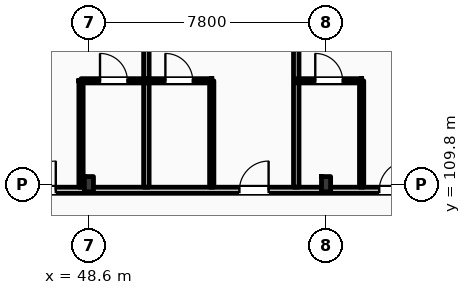
"""IFC4 building model, lengths in metres.
Left out: names, types, materials, properties, quantities, classifications, styles, units other than length and angle.
Written with IfcOpenShell. Run it as: python <this file> out.ifc"""

import sys

from ifc_helpers import new_model, si_unit, direction, frame, frame_2d, origin, origin_2d, place, context, subcontext, project, spatial, rectangle, i_section, extrude, element, fill, save


model = new_model("IFC4")
c1 = context("Model", 3, precision=1e-05, world=origin(), true_north=direction((0.0, 1.0)))
c2 = subcontext(c1, "Body", "Model", "MODEL_VIEW")
j1 = project(units=[si_unit("LENGTHUNIT", "METRE"), si_unit("PLANEANGLEUNIT", "RADIAN")], contexts=[c1])
p1 = place(None, origin())
s1 = spatial("IfcSite", under=j1, at=p1, CompositionType="ELEMENT")
p2 = place(p1, origin())
s2 = spatial("IfcBuilding", under=s1, at=p2, CompositionType="ELEMENT")
p3 = place(p2, frame((0.0, 0.0, 31.8)))
s3 = spatial("IfcBuildingStorey", under=s2, at=p3, CompositionType="ELEMENT", Elevation=31.8)
for number, where, z_axis, x_axis in (
    (1, (48.6, 109.8, 0.0), (0.0, 0.0, 1.0), (1.0, 0.0, 0.0)),
    (2, (56.4, 109.8, 0.0), (0.0, 0.0, 1.0), (1.0, 0.0, 0.0)),
):
    element("IfcColumn", number, at=place(p3, frame(where, z_axis=z_axis, x_axis=x_axis)), inside=s3, PredefinedType="COLUMN", context=c2, shape_type="SweptSolid", body=[
        extrude(i_section(OverallWidth=0.3, OverallDepth=0.5, WebThickness=0.014, FlangeThickness=0.028, FilletRadius=0.027, at=origin_2d()), origin(), (0.0, 0.0, 1.0), 3.6),
    ])
p4 = place(p3, frame((10.65, 109.6, 0.0), z_axis=(0.0, 0.0, 1.0), x_axis=(1.0, 0.0, 0.0)))
e3 = element("IfcWall", 3, at=p4, inside=s3, PredefinedType="PARTITIONING", context=c2, shape_type="SweptSolid", body=[
    extrude(rectangle(XDim=109.21, YDim=0.2, at=frame_2d((54.605, 0.0))), origin(), (0.0, 0.0, 1.0), 2.72),
])
p5 = place(p4, frame((15.825, 0.0, 0.0)))
e4 = element("IfcOpeningElement", 4, at=p5, cuts=e3, PredefinedType="OPENING", context=c2, shape_type="SweptSolid", body=[
    extrude(rectangle(XDim=1.02, YDim=2.2, at=frame_2d((0.51, 1.1))), frame((0.0, 0.11, 0.0), z_axis=(0.0, -1.0, 0.0), x_axis=(1.0, 0.0, 0.0)), (0.0, 0.0, 1.0), 0.22),
])
p6 = place(p4, frame((19.87, 0.0, 0.0)))
e5 = element("IfcOpeningElement", 5, at=p6, cuts=e3, PredefinedType="OPENING", context=c2, shape_type="SweptSolid", body=[
    extrude(rectangle(XDim=1.02, YDim=2.2, at=frame_2d((0.51, 1.1))), frame((0.0, 0.11, 0.0), z_axis=(0.0, -1.0, 0.0), x_axis=(1.0, 0.0, 0.0)), (0.0, 0.0, 1.0), 0.22),
])
p7 = place(p4, frame((24.47, 0.0, 0.0)))
e6 = element("IfcOpeningElement", 6, at=p7, cuts=e3, PredefinedType="OPENING", context=c2, shape_type="SweptSolid", body=[
    extrude(rectangle(XDim=1.02, YDim=2.2, at=frame_2d((0.51, 1.1))), frame((0.0, 0.11, 0.0), z_axis=(0.0, -1.0, 0.0), x_axis=(1.0, 0.0, 0.0)), (0.0, 0.0, 1.0), 0.22),
])
p8 = place(p4, frame((26.92, 0.0, 0.0)))
e7 = element("IfcOpeningElement", 7, at=p8, cuts=e3, PredefinedType="OPENING", context=c2, shape_type="SweptSolid", body=[
    extrude(rectangle(XDim=1.02, YDim=2.2, at=frame_2d((0.51, 1.1))), frame((0.0, 0.11, 0.0), z_axis=(0.0, -1.0, 0.0), x_axis=(1.0, 0.0, 0.0)), (0.0, 0.0, 1.0), 0.22),
])
p9 = place(p4, frame((33.7, 0.0, 0.0)))
e8 = element("IfcOpeningElement", 8, at=p9, cuts=e3, PredefinedType="OPENING", context=c2, shape_type="SweptSolid", body=[
    extrude(rectangle(XDim=0.96, YDim=2.2, at=frame_2d((0.48, 1.1))), frame((0.0, 0.11, 0.0), z_axis=(0.0, -1.0, 0.0), x_axis=(1.0, 0.0, 0.0)), (0.0, 0.0, 1.0), 0.22),
])
p10 = place(p4, frame((35.9, 0.0, 0.0)))
e9 = element("IfcOpeningElement", 9, at=p10, cuts=e3, PredefinedType="OPENING", context=c2, shape_type="SweptSolid", body=[
    extrude(rectangle(XDim=0.96, YDim=2.2, at=frame_2d((0.48, 1.1))), frame((0.0, 0.11, 0.0), z_axis=(0.0, -1.0, 0.0), x_axis=(1.0, 0.0, 0.0)), (0.0, 0.0, 1.0), 0.22),
])
p11 = place(p4, frame((42.9, 0.0, 0.0)))
e10 = element("IfcOpeningElement", 10, at=p11, cuts=e3, PredefinedType="OPENING", context=c2, shape_type="SweptSolid", body=[
    extrude(rectangle(XDim=0.96, YDim=2.2, at=frame_2d((0.48, 1.1))), frame((0.0, 0.11, 0.0), z_axis=(0.0, -1.0, 0.0), x_axis=(1.0, 0.0, 0.0)), (0.0, 0.0, 1.0), 0.22),
])
p12 = place(p4, frame((47.5, 0.0, 0.0)))
e11 = element("IfcOpeningElement", 11, at=p12, cuts=e3, PredefinedType="OPENING", context=c2, shape_type="SweptSolid", body=[
    extrude(rectangle(XDim=0.96, YDim=2.2, at=frame_2d((0.48, 1.1))), frame((0.0, 0.11, 0.0), z_axis=(0.0, -1.0, 0.0), x_axis=(1.0, 0.0, 0.0)), (0.0, 0.0, 1.0), 0.22),
])
p13 = place(p4, frame((49.95, 0.0, 0.0)))
e12 = element("IfcOpeningElement", 12, at=p13, cuts=e3, PredefinedType="OPENING", context=c2, shape_type="SweptSolid", body=[
    extrude(rectangle(XDim=0.96, YDim=2.2, at=frame_2d((0.48, 1.1))), frame((0.0, 0.11, 0.0), z_axis=(0.0, -1.0, 0.0), x_axis=(1.0, 0.0, 0.0)), (0.0, 0.0, 1.0), 0.22),
])
p14 = place(p4, frame((56.7, 0.0, 0.0)))
e13 = element("IfcOpeningElement", 13, at=p14, cuts=e3, PredefinedType="OPENING", context=c2, shape_type="SweptSolid", body=[
    extrude(rectangle(XDim=0.96, YDim=2.2, at=frame_2d((0.48, 1.1))), frame((0.0, 0.11, 0.0), z_axis=(0.0, -1.0, 0.0), x_axis=(1.0, 0.0, 0.0)), (0.0, 0.0, 1.0), 0.22),
])
p15 = place(p4, frame((59.15, 0.0, 0.0)))
e14 = element("IfcOpeningElement", 14, at=p15, cuts=e3, PredefinedType="OPENING", context=c2, shape_type="SweptSolid", body=[
    extrude(rectangle(XDim=0.96, YDim=2.2, at=frame_2d((0.48, 1.1))), frame((0.0, 0.11, 0.0), z_axis=(0.0, -1.0, 0.0), x_axis=(1.0, 0.0, 0.0)), (0.0, 0.0, 1.0), 0.22),
])
p16 = place(p4, frame((65.9, 0.0, 0.0)))
e15 = element("IfcOpeningElement", 15, at=p16, cuts=e3, PredefinedType="OPENING", context=c2, shape_type="SweptSolid", body=[
    extrude(rectangle(XDim=0.96, YDim=2.2, at=frame_2d((0.48, 1.1))), frame((0.0, 0.11, 0.0), z_axis=(0.0, -1.0, 0.0), x_axis=(1.0, 0.0, 0.0)), (0.0, 0.0, 1.0), 0.22),
])
p17 = place(p4, frame((70.5, 0.0, 0.0)))
e16 = element("IfcOpeningElement", 16, at=p17, cuts=e3, PredefinedType="OPENING", context=c2, shape_type="SweptSolid", body=[
    extrude(rectangle(XDim=0.96, YDim=2.2, at=frame_2d((0.48, 1.1))), frame((0.0, 0.11, 0.0), z_axis=(0.0, -1.0, 0.0), x_axis=(1.0, 0.0, 0.0)), (0.0, 0.0, 1.0), 0.22),
])
p18 = place(p4, frame((72.95, 0.0, 0.0)))
e17 = element("IfcOpeningElement", 17, at=p18, cuts=e3, PredefinedType="OPENING", context=c2, shape_type="SweptSolid", body=[
    extrude(rectangle(XDim=0.96, YDim=2.2, at=frame_2d((0.48, 1.1))), frame((0.0, 0.11, 0.0), z_axis=(0.0, -1.0, 0.0), x_axis=(1.0, 0.0, 0.0)), (0.0, 0.0, 1.0), 0.22),
])
p19 = place(p4, frame((79.7, 0.0, 0.0)))
e18 = element("IfcOpeningElement", 18, at=p19, cuts=e3, PredefinedType="OPENING", context=c2, shape_type="SweptSolid", body=[
    extrude(rectangle(XDim=0.96, YDim=2.2, at=frame_2d((0.48, 1.1))), frame((0.0, 0.11, 0.0), z_axis=(0.0, -1.0, 0.0), x_axis=(1.0, 0.0, 0.0)), (0.0, 0.0, 1.0), 0.22),
])
p20 = place(p4, frame((82.15, 0.0, 0.0)))
e19 = element("IfcOpeningElement", 19, at=p20, cuts=e3, PredefinedType="OPENING", context=c2, shape_type="SweptSolid", body=[
    extrude(rectangle(XDim=0.96, YDim=2.2, at=frame_2d((0.48, 1.1))), frame((0.0, 0.11, 0.0), z_axis=(0.0, -1.0, 0.0), x_axis=(1.0, 0.0, 0.0)), (0.0, 0.0, 1.0), 0.22),
])
p21 = place(p4, frame((88.9, 0.0, 0.0)))
e20 = element("IfcOpeningElement", 20, at=p21, cuts=e3, PredefinedType="OPENING", context=c2, shape_type="SweptSolid", body=[
    extrude(rectangle(XDim=0.96, YDim=2.2, at=frame_2d((0.48, 1.1))), frame((0.0, 0.11, 0.0), z_axis=(0.0, -1.0, 0.0), x_axis=(1.0, 0.0, 0.0)), (0.0, 0.0, 1.0), 0.22),
])
p22 = place(p4, frame((93.75, 0.0, 0.0)))
e21 = element("IfcOpeningElement", 21, at=p22, cuts=e3, PredefinedType="OPENING", context=c2, shape_type="SweptSolid", body=[
    extrude(rectangle(XDim=0.96, YDim=2.2, at=frame_2d((0.48, 1.1))), frame((0.0, 0.11, 0.0), z_axis=(0.0, -1.0, 0.0), x_axis=(1.0, 0.0, 0.0)), (0.0, 0.0, 1.0), 0.22),
])
p23 = place(p4, frame((98.1, 0.0, 0.0)))
e22 = element("IfcOpeningElement", 22, at=p23, cuts=e3, PredefinedType="OPENING", context=c2, shape_type="SweptSolid", body=[
    extrude(rectangle(XDim=0.96, YDim=2.2, at=frame_2d((0.48, 1.1))), frame((0.0, 0.11, 0.0), z_axis=(0.0, -1.0, 0.0), x_axis=(1.0, 0.0, 0.0)), (0.0, 0.0, 1.0), 0.22),
])
p24 = place(p4, frame((102.7, 0.0, 0.0)))
e23 = element("IfcOpeningElement", 23, at=p24, cuts=e3, PredefinedType="OPENING", context=c2, shape_type="SweptSolid", body=[
    extrude(rectangle(XDim=0.96, YDim=2.2, at=frame_2d((0.48, 1.1))), frame((0.0, 0.11, 0.0), z_axis=(0.0, -1.0, 0.0), x_axis=(1.0, 0.0, 0.0)), (0.0, 0.0, 1.0), 0.22),
])
p25 = place(p4, frame((105.04, 0.0, 0.0)))
e24 = element("IfcOpeningElement", 24, at=p25, cuts=e3, PredefinedType="OPENING", context=c2, shape_type="SweptSolid", body=[
    extrude(rectangle(XDim=0.96, YDim=2.2, at=frame_2d((0.48, 1.1))), frame((0.0, 0.11, 0.0), z_axis=(0.0, -1.0, 0.0), x_axis=(1.0, 0.0, 0.0)), (0.0, 0.0, 1.0), 0.22),
])
p26 = place(p4, frame((2.716, 0.0, 0.0)))
e25 = element("IfcOpeningElement", 25, at=p26, cuts=e3, PredefinedType="OPENING", context=c2, shape_type="SweptSolid", body=[
    extrude(rectangle(XDim=1.35, YDim=2.25, at=frame_2d((0.675, 1.125))), frame((0.0, 0.11, 0.0), z_axis=(0.0, -1.0, 0.0), x_axis=(1.0, 0.0, 0.0)), (0.0, 0.0, 1.0), 0.22),
])
p27 = place(p4, frame((6.65, 0.0, 0.0)))
e26 = element("IfcOpeningElement", 26, at=p27, cuts=e3, PredefinedType="OPENING", context=c2, shape_type="SweptSolid", body=[
    extrude(rectangle(XDim=1.35, YDim=2.25, at=frame_2d((0.675, 1.125))), frame((0.0, 0.11, 0.0), z_axis=(0.0, -1.0, 0.0), x_axis=(1.0, 0.0, 0.0)), (0.0, 0.0, 1.0), 0.22),
])
p28 = place(p4, frame((10.583, 0.0, 0.0)))
e27 = element("IfcOpeningElement", 27, at=p28, cuts=e3, PredefinedType="OPENING", context=c2, shape_type="SweptSolid", body=[
    extrude(rectangle(XDim=1.35, YDim=2.25, at=frame_2d((0.675, 1.125))), frame((0.0, 0.11, 0.0), z_axis=(0.0, -1.0, 0.0), x_axis=(1.0, 0.0, 0.0)), (0.0, 0.0, 1.0), 0.22),
])
p29 = place(p3, frame((50.49, 109.7, 0.0), z_axis=(0.0, 0.0, 1.0), x_axis=(0.0, 1.0, 0.0)))
e28 = element("IfcWall", 28, at=p29, inside=s3, PredefinedType="PARTITIONING", context=c2, shape_type="SweptSolid", body=[
    extrude(rectangle(XDim=8.15, YDim=0.18, at=frame_2d((4.075, 0.0))), origin(), (0.0, 0.0, 1.0), 3.36),
])
p30 = place(p3, frame((48.34, 109.7, 0.0), z_axis=(0.0, 0.0, 1.0), x_axis=(0.0, 1.0, 0.0)))
e29 = element("IfcWall", 29, at=p30, inside=s3, PredefinedType="PARTITIONING", context=c2, shape_type="SweptSolid", body=[
    extrude(rectangle(XDim=3.5, YDim=0.14, at=frame_2d((1.75, 0.0))), origin(), (0.0, 0.0, 1.0), 3.36),
])
p31 = place(p3, frame((48.34, 113.2, 0.0), z_axis=(0.0, 0.0, 1.0), x_axis=(1.0, 0.0, 0.0)))
e30 = element("IfcWall", 30, at=p31, inside=s3, PredefinedType="PARTITIONING", context=c2, shape_type="SweptSolid", body=[
    extrude(rectangle(XDim=2.15, YDim=0.14, at=frame_2d((1.075, 0.0))), origin(), (0.0, 0.0, 1.0), 3.36),
])
p32 = place(p31, frame((0.625, 0.0, 0.0)))
e31 = element("IfcOpeningElement", 31, at=p32, cuts=e30, PredefinedType="OPENING", context=c2, shape_type="SweptSolid", body=[
    extrude(rectangle(XDim=0.9, YDim=2.1, at=frame_2d((0.45, 1.05))), frame((0.0, 0.08, 0.0), z_axis=(0.0, -1.0, 0.0), x_axis=(1.0, 0.0, 0.0)), (0.0, 0.0, 1.0), 0.16),
])
p33 = place(p3, frame((55.42, 109.7, 0.0), z_axis=(0.0, 0.0, 1.0), x_axis=(0.0, 1.0, 0.0)))
e32 = element("IfcWall", 32, at=p33, inside=s3, PredefinedType="PARTITIONING", context=c2, shape_type="SweptSolid", body=[
    extrude(rectangle(XDim=8.15, YDim=0.18, at=frame_2d((4.075, 0.0))), origin(), (0.0, 0.0, 1.0), 3.36),
])
p34 = place(p3, frame((52.64, 109.7, 0.0), z_axis=(0.0, 0.0, 1.0), x_axis=(0.0, 1.0, 0.0)))
e33 = element("IfcWall", 33, at=p34, inside=s3, PredefinedType="PARTITIONING", context=c2, shape_type="SweptSolid", body=[
    extrude(rectangle(XDim=3.5, YDim=0.14, at=frame_2d((1.75, 0.0))), origin(), (0.0, 0.0, 1.0), 3.36),
])
p35 = place(p3, frame((50.49, 113.2, 0.0), z_axis=(0.0, 0.0, 1.0), x_axis=(1.0, 0.0, 0.0)))
e34 = element("IfcWall", 34, at=p35, inside=s3, PredefinedType="PARTITIONING", context=c2, shape_type="SweptSolid", body=[
    extrude(rectangle(XDim=2.15, YDim=0.14, at=frame_2d((1.075, 0.0))), origin(), (0.0, 0.0, 1.0), 3.36),
])
p36 = place(p35, frame((0.625, 0.0, 0.0)))
e35 = element("IfcOpeningElement", 35, at=p36, cuts=e34, PredefinedType="OPENING", context=c2, shape_type="SweptSolid", body=[
    extrude(rectangle(XDim=0.9, YDim=2.1, at=frame_2d((0.45, 1.05))), frame((0.0, 0.08, 0.0), z_axis=(0.0, -1.0, 0.0), x_axis=(1.0, 0.0, 0.0)), (0.0, 0.0, 1.0), 0.16),
])
p37 = place(p3, frame((57.57, 109.7, 0.0), z_axis=(0.0, 0.0, 1.0), x_axis=(0.0, 1.0, 0.0)))
e36 = element("IfcWall", 36, at=p37, inside=s3, PredefinedType="PARTITIONING", context=c2, shape_type="SweptSolid", body=[
    extrude(rectangle(XDim=3.5, YDim=0.14, at=frame_2d((1.75, 0.0))), origin(), (0.0, 0.0, 1.0), 3.36),
])
p38 = place(p3, frame((55.42, 113.2, 0.0), z_axis=(0.0, 0.0, 1.0), x_axis=(1.0, 0.0, 0.0)))
e37 = element("IfcWall", 37, at=p38, inside=s3, PredefinedType="PARTITIONING", context=c2, shape_type="SweptSolid", body=[
    extrude(rectangle(XDim=2.15, YDim=0.14, at=frame_2d((1.075, 0.0))), origin(), (0.0, 0.0, 1.0), 3.36),
])
p39 = place(p38, frame((0.625, 0.0, 0.0)))
e38 = element("IfcOpeningElement", 38, at=p39, cuts=e37, PredefinedType="OPENING", context=c2, shape_type="SweptSolid", body=[
    extrude(rectangle(XDim=0.9, YDim=2.1, at=frame_2d((0.45, 1.05))), frame((0.0, 0.08, 0.0), z_axis=(0.0, -1.0, 0.0), x_axis=(1.0, 0.0, 0.0)), (0.0, 0.0, 1.0), 0.16),
])
p40 = place(p10, origin())
e39 = element("IfcDoor", 39, at=p40, inside=s3, OperationType="SINGLE_SWING_RIGHT", PredefinedType="DOOR", context=c2, shape_type="SweptSolid", body=[
    extrude(rectangle(XDim=0.96, YDim=2.2, at=frame_2d((0.48, 1.1))), frame((0.0, 0.025, 0.0), z_axis=(0.0, -1.0, 0.0), x_axis=(1.0, 0.0, 0.0)), (0.0, 0.0, 1.0), 0.05),
])
fill(e9, e39)
p41 = place(p32, origin())
e40 = element("IfcDoor", 40, at=p41, inside=s3, OperationType="SINGLE_SWING_LEFT", PredefinedType="DOOR", context=c2, shape_type="SweptSolid", body=[
    extrude(rectangle(XDim=0.9, YDim=2.1, at=frame_2d((0.45, 1.05))), frame((0.0, 0.025, 0.0), z_axis=(0.0, -1.0, 0.0), x_axis=(1.0, 0.0, 0.0)), (0.0, 0.0, 1.0), 0.05),
])
fill(e31, e40)
p42 = place(p11, origin())
e41 = element("IfcDoor", 41, at=p42, inside=s3, OperationType="SINGLE_SWING_RIGHT", PredefinedType="DOOR", context=c2, shape_type="SweptSolid", body=[
    extrude(rectangle(XDim=0.96, YDim=2.2, at=frame_2d((0.48, 1.1))), frame((0.0, 0.025, 0.0), z_axis=(0.0, -1.0, 0.0), x_axis=(1.0, 0.0, 0.0)), (0.0, 0.0, 1.0), 0.05),
])
fill(e10, e41)
p43 = place(p36, origin())
e42 = element("IfcDoor", 42, at=p43, inside=s3, OperationType="SINGLE_SWING_LEFT", PredefinedType="DOOR", context=c2, shape_type="SweptSolid", body=[
    extrude(rectangle(XDim=0.9, YDim=2.1, at=frame_2d((0.45, 1.05))), frame((0.0, 0.025, 0.0), z_axis=(0.0, -1.0, 0.0), x_axis=(1.0, 0.0, 0.0)), (0.0, 0.0, 1.0), 0.05),
])
fill(e35, e42)
p44 = place(p12, origin())
e43 = element("IfcDoor", 43, at=p44, inside=s3, OperationType="SINGLE_SWING_RIGHT", PredefinedType="DOOR", context=c2, shape_type="SweptSolid", body=[
    extrude(rectangle(XDim=0.96, YDim=2.2, at=frame_2d((0.48, 1.1))), frame((0.0, 0.025, 0.0), z_axis=(0.0, -1.0, 0.0), x_axis=(1.0, 0.0, 0.0)), (0.0, 0.0, 1.0), 0.05),
])
fill(e11, e43)
p45 = place(p39, origin())
e44 = element("IfcDoor", 44, at=p45, inside=s3, OperationType="SINGLE_SWING_LEFT", PredefinedType="DOOR", context=c2, shape_type="SweptSolid", body=[
    extrude(rectangle(XDim=0.9, YDim=2.1, at=frame_2d((0.45, 1.05))), frame((0.0, 0.025, 0.0), z_axis=(0.0, -1.0, 0.0), x_axis=(1.0, 0.0, 0.0)), (0.0, 0.0, 1.0), 0.05),
])
fill(e38, e44)
save(model, sys.argv[1])
